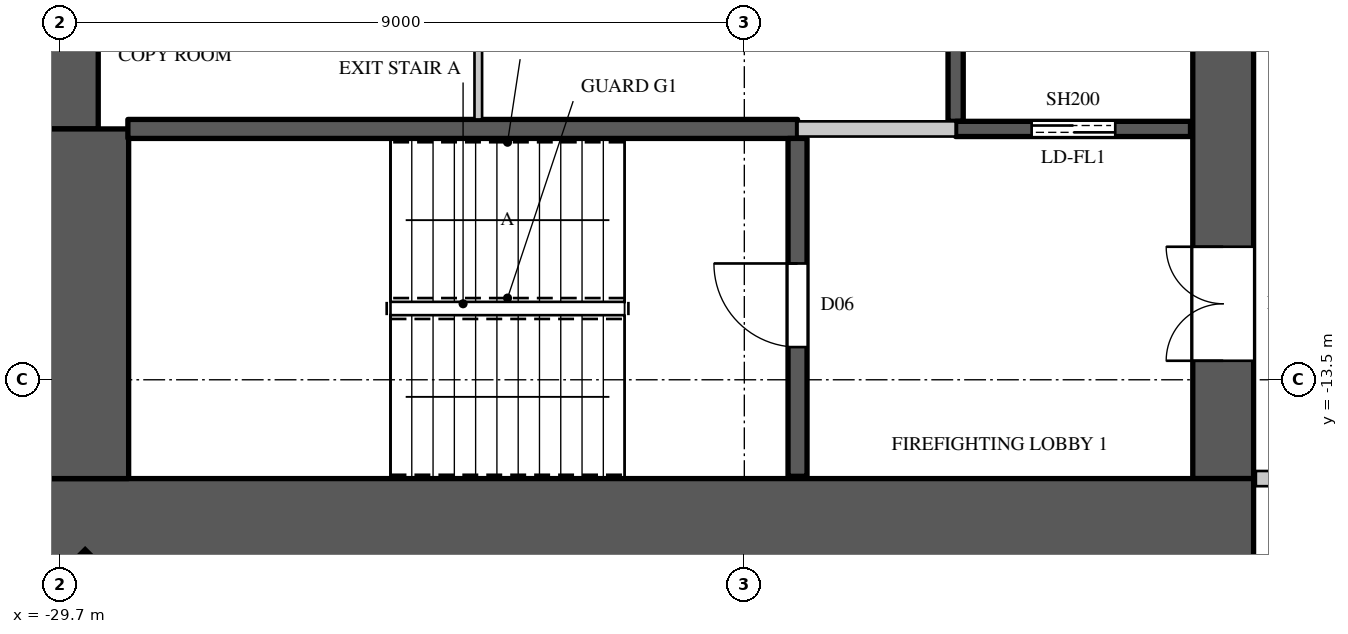
"""IFC4 building model, lengths in metres.
Left out: names, types, materials, properties, quantities, classifications, styles, units other than length and angle.
Written with IfcOpenShell. Run it as: python <this file> out.ifc"""

import sys

from ifc_helpers import new_model, si_unit, direction, frame, frame_2d, origin, origin_2d, place, context, subcontext, project, spatial, rectangle, extrude, element, fill, save


model = new_model("IFC4")
c1 = context("Model", 3, precision=1e-05, world=origin(), true_north=direction((0.0, 1.0)))
c2 = subcontext(c1, "Body", "Model", "MODEL_VIEW")
j1 = project(units=[si_unit("LENGTHUNIT", "METRE"), si_unit("PLANEANGLEUNIT", "RADIAN")], contexts=[c1])
p1 = place(None, origin())
s1 = spatial("IfcSite", under=j1, at=p1, CompositionType="ELEMENT")
p2 = place(p1, origin())
s2 = spatial("IfcBuilding", under=s1, at=p2, CompositionType="ELEMENT")
p3 = place(p2, frame((0.0, 0.0, 230.2)))
s3 = spatial("IfcBuildingStorey", under=s2, at=p3, CompositionType="ELEMENT", Elevation=230.2)
p4 = place(p3, frame((-29.443, -16.443, 0.0), z_axis=(0.0, 0.0, 1.0), x_axis=(0.707106781187, -0.707106781187, 0.0)))
e1 = element("IfcColumn", 1, at=p4, inside=s3, PredefinedType="COLUMN", context=c2, shape_type="SweptSolid", body=[
    extrude(rectangle(XDim=0.9, YDim=1.1, at=origin_2d()), origin(), (0.0, 0.0, 1.0), 4.1),
])
p5 = place(p3, frame((-30.0, -15.4, 0.0), z_axis=(0.0, 0.0, 1.0), x_axis=(1.0, 0.0, 0.0)))
e2 = element("IfcWall", 2, at=p5, inside=s3, PredefinedType="SHEAR", context=c2, shape_type="SweptSolid", body=[
    extrude(rectangle(XDim=16.0, YDim=1.2, at=frame_2d((8.0, 0.0))), origin(), (0.0, 0.0, 1.0), 4.1),
])
p6 = place(p3, frame((-14.4, -14.8, 0.0), z_axis=(0.0, 0.0, 1.0), x_axis=(0.0, 1.0, 0.0)))
e3 = element("IfcWall", 3, at=p6, inside=s3, PredefinedType="SHEAR", context=c2, shape_type="SweptSolid", body=[
    extrude(rectangle(XDim=29.6, YDim=0.8, at=frame_2d((14.8, 0.0))), origin(), (0.0, 0.0, 1.0), 4.1),
])
p7 = place(p6, frame((1.55, 0.0, 0.0)))
e4 = element("IfcOpeningElement", 4, at=p7, cuts=e3, PredefinedType="OPENING", context=c2, shape_type="SweptSolid", body=[
    extrude(rectangle(XDim=1.5, YDim=2.4, at=frame_2d((0.75, 1.2))), frame((0.0, 0.41, 0.0), z_axis=(0.0, -1.0, 0.0), x_axis=(1.0, 0.0, 0.0)), (0.0, 0.0, 1.0), 0.82),
])
p8 = place(p6, frame((26.55, 0.0, 0.0)))
e5 = element("IfcOpeningElement", 5, at=p8, cuts=e3, PredefinedType="OPENING", context=c2, shape_type="SweptSolid", body=[
    extrude(rectangle(XDim=1.5, YDim=2.4, at=frame_2d((0.75, 1.2))), frame((0.0, 0.41, 0.0), z_axis=(0.0, -1.0, 0.0), x_axis=(1.0, 0.0, 0.0)), (0.0, 0.0, 1.0), 0.82),
])
p9 = place(p6, frame((8.45, 0.0, 0.0)))
e6 = element("IfcOpeningElement", 6, at=p9, cuts=e3, PredefinedType="OPENING", context=c2, shape_type="SweptSolid", body=[
    extrude(rectangle(XDim=1.5, YDim=2.4, at=frame_2d((0.75, 1.2))), frame((0.0, 0.41, 0.0), z_axis=(0.0, -1.0, 0.0), x_axis=(1.0, 0.0, 0.0)), (0.0, 0.0, 1.0), 0.82),
])
p10 = place(p6, frame((19.65, 0.0, 0.0)))
e7 = element("IfcOpeningElement", 7, at=p10, cuts=e3, PredefinedType="OPENING", context=c2, shape_type="SweptSolid", body=[
    extrude(rectangle(XDim=1.5, YDim=2.4, at=frame_2d((0.75, 1.2))), frame((0.0, 0.41, 0.0), z_axis=(0.0, -1.0, 0.0), x_axis=(1.0, 0.0, 0.0)), (0.0, 0.0, 1.0), 0.82),
])
p11 = place(p6, frame((14.5, 0.0, 0.0)))
e8 = element("IfcOpeningElement", 8, at=p11, cuts=e3, PredefinedType="OPENING", context=c2, shape_type="SweptSolid", body=[
    extrude(rectangle(XDim=0.6, YDim=2.0, at=frame_2d((0.3, 1.0))), frame((0.0, 0.41, 0.0), z_axis=(0.0, -1.0, 0.0), x_axis=(1.0, 0.0, 0.0)), (0.0, 0.0, 1.0), 0.82),
])
p12 = place(p3, frame((-29.6, -10.2, 0.0), z_axis=(0.0, 0.0, 1.0), x_axis=(0.0, 1.0, 0.0)))
e9 = element("IfcWall", 9, at=p12, inside=s3, PredefinedType="SHEAR", context=c2, shape_type="SweptSolid", body=[
    extrude(rectangle(XDim=20.4, YDim=0.8, at=frame_2d((10.2, 0.0))), origin(), (0.0, 0.0, 1.0), 4.1),
])
p13 = place(p3, frame((-29.4, -14.8, 0.0), z_axis=(0.0, 0.0, 1.0), x_axis=(0.0, 1.0, 0.0)))
e10 = element("IfcWall", 10, at=p13, inside=s3, PredefinedType="SHEAR", context=c2, shape_type="SweptSolid", body=[
    extrude(rectangle(XDim=4.6, YDim=1.2, at=frame_2d((2.3, 0.0))), origin(), (0.0, 0.0, 1.0), 4.1),
])
p14 = place(p3, frame((-20.0, -10.2, 0.0), z_axis=(0.0, 0.0, 1.0), x_axis=(1.0, 0.0, 0.0)))
e11 = element("IfcWall", 11, at=p14, inside=s3, PredefinedType="PARTITIONING", context=c2, shape_type="SweptSolid", body=[
    extrude(rectangle(XDim=2.08, YDim=0.2, at=frame_2d((1.04, 0.0))), origin(), (0.0, 0.0, 1.0), 3.8),
])
p15 = place(p3, frame((-13.97, -14.8, 0.0), z_axis=(0.0, 0.0, 1.0), x_axis=(1.0, 0.0, 0.0)))
e12 = element("IfcWall", 12, at=p15, inside=s3, PredefinedType="PARTITIONING", context=c2, shape_type="SweptSolid", body=[
    extrude(rectangle(XDim=2.87, YDim=0.2, at=frame_2d((1.435, 0.0))), origin(), (0.0, 0.0, 1.0), 3.8),
])
p16 = place(p3, frame((-17.92, -10.1, 0.0), z_axis=(0.0, 0.0, 1.0), x_axis=(0.0, 1.0, 0.0)))
e13 = element("IfcWall", 13, at=p16, inside=s3, PredefinedType="SHEAR", context=c2, shape_type="SweptSolid", body=[
    extrude(rectangle(XDim=2.6, YDim=0.2, at=frame_2d((1.3, 0.0))), origin(), (0.0, 0.0, 1.0), 3.8),
])
p17 = place(p3, frame((-17.92, -10.2, 0.0), z_axis=(0.0, 0.0, 1.0), x_axis=(1.0, 0.0, 0.0)))
e14 = element("IfcWall", 14, at=p17, inside=s3, PredefinedType="SHEAR", context=c2, shape_type="SweptSolid", body=[
    extrude(rectangle(XDim=3.09, YDim=0.2, at=frame_2d((1.545, 0.0))), origin(), (0.0, 0.0, 1.0), 3.8),
])
p18 = place(p17, frame((1.0, 0.0, 0.0)))
e15 = element("IfcOpeningElement", 15, at=p18, cuts=e14, PredefinedType="OPENING", context=c2, shape_type="SweptSolid", body=[
    extrude(rectangle(XDim=1.1, YDim=2.2, at=frame_2d((0.55, 1.1))), frame((0.0, 0.11, 0.0), z_axis=(0.0, -1.0, 0.0), x_axis=(1.0, 0.0, 0.0)), (0.0, 0.0, 1.0), 0.22),
])
p19 = place(p3, frame((-28.81, -10.2, 0.0), z_axis=(0.0, 0.0, 1.0), x_axis=(1.0, 0.0, 0.0)))
e16 = element("IfcWall", 16, at=p19, inside=s3, PredefinedType="SHEAR", context=c2, shape_type="SweptSolid", body=[
    extrude(rectangle(XDim=8.81, YDim=0.25, at=frame_2d((4.405, 0.0))), origin(), (0.0, 0.0, 1.0), 3.8),
])
p20 = place(p3, frame((-20.0, -14.77, 0.0), z_axis=(0.0, 0.0, 1.0), x_axis=(0.0, 1.0, 0.0)))
e17 = element("IfcWall", 17, at=p20, inside=s3, PredefinedType="SHEAR", context=c2, shape_type="SweptSolid", body=[
    extrude(rectangle(XDim=4.445, YDim=0.25, at=frame_2d((2.223, 0.0))), origin(), (0.0, 0.0, 1.0), 3.8),
])
p21 = place(p20, frame((1.7, 0.0, 0.0)))
e18 = element("IfcOpeningElement", 18, at=p21, cuts=e17, PredefinedType="OPENING", context=c2, shape_type="SweptSolid", body=[
    extrude(rectangle(XDim=1.1, YDim=2.2, at=frame_2d((0.55, 1.1))), frame((0.0, 0.135, 0.0), z_axis=(0.0, -1.0, 0.0), x_axis=(1.0, 0.0, 0.0)), (0.0, 0.0, 1.0), 0.27),
])
p22 = place(p3, frame((-24.2, -10.075, 0.0), z_axis=(0.0, 0.0, 1.0), x_axis=(0.0, 1.0, 0.0)))
e19 = element("IfcWall", 19, at=p22, inside=s3, PredefinedType="PARTITIONING", context=c2, shape_type="SweptSolid", body=[
    extrude(rectangle(XDim=2.575, YDim=0.1, at=frame_2d((1.288, 0.0))), origin(), (0.0, 0.0, 1.0), 3.8),
])
p23 = place(p21, origin())
e20 = element("IfcDoor", 20, at=p23, inside=s3, OperationType="SINGLE_SWING_RIGHT", PredefinedType="DOOR", context=c2, shape_type="SweptSolid", body=[
    extrude(rectangle(XDim=1.1, YDim=2.2, at=frame_2d((0.55, 1.1))), frame((0.0, 0.025, 0.0), z_axis=(0.0, -1.0, 0.0), x_axis=(1.0, 0.0, 0.0)), (0.0, 0.0, 1.0), 0.05),
])
fill(e18, e20)
p24 = place(p18, origin())
e21 = element("IfcDoor", 21, at=p24, inside=s3, OperationType="DOUBLE_DOOR_SLIDING", PredefinedType="DOOR", context=c2, shape_type="SweptSolid", body=[
    extrude(rectangle(XDim=1.1, YDim=2.2, at=frame_2d((0.55, 1.1))), frame((0.0, 0.025, 0.0), z_axis=(0.0, -1.0, 0.0), x_axis=(1.0, 0.0, 0.0)), (0.0, 0.0, 1.0), 0.05),
])
fill(e15, e21)
p25 = place(p7, origin())
e22 = element("IfcDoor", 22, at=p25, inside=s3, OperationType="DOUBLE_DOOR_SINGLE_SWING", PredefinedType="DOOR", context=c2, shape_type="SweptSolid", body=[
    extrude(rectangle(XDim=1.5, YDim=2.4, at=frame_2d((0.75, 1.2))), frame((0.0, 0.395, 0.0), z_axis=(0.0, -1.0, 0.0), x_axis=(1.0, 0.0, 0.0)), (0.0, 0.0, 1.0), 0.05),
])
fill(e4, e22)
save(model, sys.argv[1])
